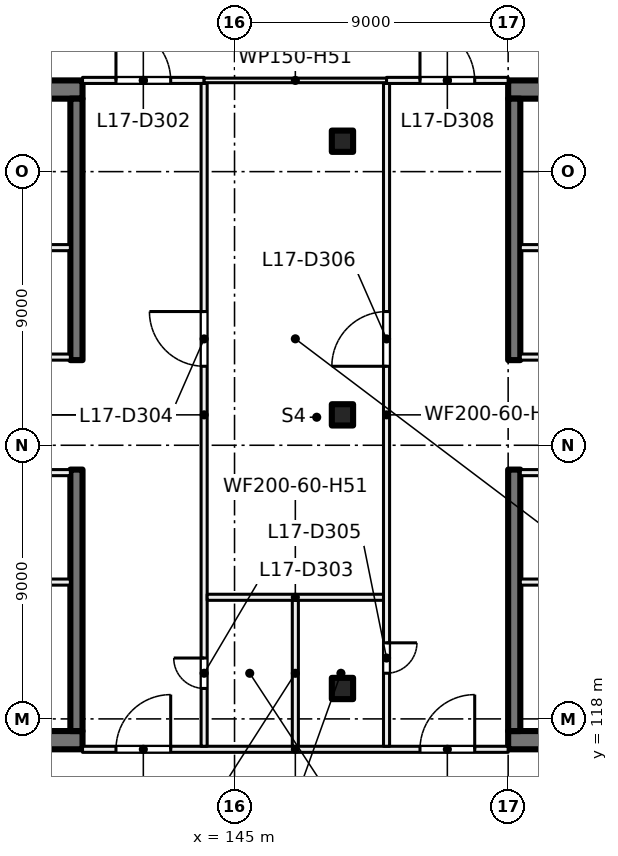
"""IFC4 building model, lengths in metres.
Left out: names, types, materials, properties, quantities, classifications, styles, units other than length and angle.
Written with IfcOpenShell. Run it as: python <this file> out.ifc"""

import sys

from ifc_helpers import new_model, si_unit, direction, frame, frame_2d, origin, origin_2d, place, context, subcontext, project, spatial, rectangle, extrude, element, fill, save


model = new_model("IFC4")
c1 = context("Model", 3, precision=1e-05, world=origin(), true_north=direction((0.0, 1.0)))
c2 = subcontext(c1, "Body", "Model", "MODEL_VIEW")
j1 = project(units=[si_unit("LENGTHUNIT", "METRE"), si_unit("PLANEANGLEUNIT", "RADIAN")], contexts=[c1])
p1 = place(None, origin())
s1 = spatial("IfcSite", under=j1, at=p1, CompositionType="ELEMENT")
p2 = place(p1, origin())
s2 = spatial("IfcBuilding", under=s1, at=p2, CompositionType="ELEMENT")
p3 = place(p2, frame((0.0, 0.0, 75.5)))
s3 = spatial("IfcBuildingStorey", under=s2, at=p3, CompositionType="ELEMENT", Elevation=75.5)
for number, where, z_axis, x_axis in (
    (1, (148.55, 119.0, 0.0), (0.0, 0.0, 1.0), (1.0, 0.0, 0.0)),
    (2, (148.55, 128.0, 0.0), (0.0, 0.0, 1.0), (1.0, 0.0, 0.0)),
    (3, (148.55, 137.0, 0.0), (0.0, 0.0, 1.0), (1.0, 0.0, 0.0)),
):
    element("IfcColumn", number, at=place(p3, frame(where, z_axis=z_axis, x_axis=x_axis)), inside=s3, PredefinedType="COLUMN", context=c2, shape_type="SweptSolid", body=[
        extrude(rectangle(XDim=0.7, YDim=0.7, at=origin_2d()), origin(), (0.0, 0.0, 1.0), 5.5),
    ])
for number, where, z_axis, x_axis in (
    (4, (135.4, 117.3, 0.0), (0.0, 0.0, 1.0), (1.0, 0.0, 0.0)),
    (5, (135.4, 138.7, 0.0), (0.0, 0.0, 1.0), (1.0, 0.0, 0.0)),
):
    element("IfcWall", number, at=place(p3, frame(where, z_axis=z_axis, x_axis=x_axis)), inside=s3, PredefinedType="SHEAR", context=c2, shape_type="SweptSolid", body=[
        extrude(rectangle(XDim=4.6, YDim=0.6, at=frame_2d((2.3, 0.0))), origin(), (0.0, 0.0, 1.0), 5.5),
    ])
for number, where, z_axis, x_axis in (
    (6, (139.8, 117.6, 0.0), (0.0, 0.0, 1.0), (0.0, 1.0, 0.0)),
    (7, (139.8, 129.8, 0.0), (0.0, 0.0, 1.0), (0.0, 1.0, 0.0)),
):
    element("IfcWall", number, at=place(p3, frame(where, z_axis=z_axis, x_axis=x_axis)), inside=s3, PredefinedType="SHEAR", context=c2, shape_type="SweptSolid", body=[
        extrude(rectangle(XDim=8.6, YDim=0.4, at=frame_2d((4.3, 0.0))), origin(), (0.0, 0.0, 1.0), 5.5),
    ])
for number, where, z_axis, x_axis in (
    (8, (158.6, 138.7, 0.0), (0.0, 0.0, 1.0), (-1.0, 0.0, 0.0)),
    (9, (158.6, 117.3, 0.0), (0.0, 0.0, 1.0), (-1.0, 0.0, 0.0)),
):
    element("IfcWall", number, at=place(p3, frame(where, z_axis=z_axis, x_axis=x_axis)), inside=s3, PredefinedType="SHEAR", context=c2, shape_type="SweptSolid", body=[
        extrude(rectangle(XDim=4.6, YDim=0.6, at=frame_2d((2.3, 0.0))), origin(), (0.0, 0.0, 1.0), 5.5),
    ])
for number, where, z_axis, x_axis in (
    (10, (154.2, 138.4, 0.0), (0.0, 0.0, 1.0), (0.0, -1.0, 0.0)),
    (11, (154.2, 126.2, 0.0), (0.0, 0.0, 1.0), (0.0, -1.0, 0.0)),
):
    element("IfcWall", number, at=place(p3, frame(where, z_axis=z_axis, x_axis=x_axis)), inside=s3, PredefinedType="SHEAR", context=c2, shape_type="SweptSolid", body=[
        extrude(rectangle(XDim=8.6, YDim=0.4, at=frame_2d((4.3, 0.0))), origin(), (0.0, 0.0, 1.0), 5.5),
    ])
p4 = place(p3, frame((135.0, 129.9, 0.0), z_axis=(0.0, 0.0, 1.0), x_axis=(1.0, 0.0, 0.0)))
e12 = element("IfcWall", 12, at=p4, inside=s3, PredefinedType="PARTITIONING", context=c2, shape_type="SweptSolid", body=[
    extrude(rectangle(XDim=4.6, YDim=0.2, at=frame_2d((2.3, 0.0))), origin(), (0.0, 0.0, 1.0), 5.125),
])
p5 = place(p4, frame((1.7, 0.0, 0.0)))
e13 = element("IfcOpeningElement", 13, at=p5, cuts=e12, PredefinedType="OPENING", context=c2, shape_type="SweptSolid", body=[
    extrude(rectangle(XDim=1.2, YDim=2.1, at=frame_2d((0.6, 1.05))), frame((0.0, 0.11, 0.0), z_axis=(0.0, -1.0, 0.0), x_axis=(1.0, 0.0, 0.0)), (0.0, 0.0, 1.0), 0.22),
])
p6 = place(p3, frame((135.0, 133.5, 0.0), z_axis=(0.0, 0.0, 1.0), x_axis=(1.0, 0.0, 0.0)))
e14 = element("IfcWall", 14, at=p6, inside=s3, PredefinedType="PARTITIONING", context=c2, shape_type="SweptSolid", body=[
    extrude(rectangle(XDim=4.6, YDim=0.2, at=frame_2d((2.3, 0.0))), origin(), (0.0, 0.0, 1.0), 5.125),
])
p7 = place(p6, frame((1.75, 0.0, 0.0)))
e15 = element("IfcOpeningElement", 15, at=p7, cuts=e14, PredefinedType="OPENING", context=c2, shape_type="SweptSolid", body=[
    extrude(rectangle(XDim=1.5, YDim=2.1, at=frame_2d((0.75, 1.05))), frame((0.0, 0.11, 0.0), z_axis=(0.0, -1.0, 0.0), x_axis=(1.0, 0.0, 0.0)), (0.0, 0.0, 1.0), 0.22),
])
p8 = place(p3, frame((139.6, 126.1, 0.0), z_axis=(0.0, 0.0, 1.0), x_axis=(-1.0, 0.0, 0.0)))
e16 = element("IfcWall", 16, at=p8, inside=s3, PredefinedType="PARTITIONING", context=c2, shape_type="SweptSolid", body=[
    extrude(rectangle(XDim=4.6, YDim=0.2, at=frame_2d((2.3, 0.0))), origin(), (0.0, 0.0, 1.0), 5.125),
])
p9 = place(p8, frame((1.7, 0.0, 0.0)))
e17 = element("IfcOpeningElement", 17, at=p9, cuts=e16, PredefinedType="OPENING", context=c2, shape_type="SweptSolid", body=[
    extrude(rectangle(XDim=1.2, YDim=2.1, at=frame_2d((0.6, 1.05))), frame((0.0, 0.11, 0.0), z_axis=(0.0, -1.0, 0.0), x_axis=(1.0, 0.0, 0.0)), (0.0, 0.0, 1.0), 0.22),
])
p10 = place(p3, frame((139.6, 122.5, 0.0), z_axis=(0.0, 0.0, 1.0), x_axis=(-1.0, 0.0, 0.0)))
e18 = element("IfcWall", 18, at=p10, inside=s3, PredefinedType="PARTITIONING", context=c2, shape_type="SweptSolid", body=[
    extrude(rectangle(XDim=4.6, YDim=0.2, at=frame_2d((2.3, 0.0))), origin(), (0.0, 0.0, 1.0), 5.125),
])
p11 = place(p10, frame((1.35, 0.0, 0.0)))
e19 = element("IfcOpeningElement", 19, at=p11, cuts=e18, PredefinedType="OPENING", context=c2, shape_type="SweptSolid", body=[
    extrude(rectangle(XDim=1.5, YDim=2.1, at=frame_2d((0.75, 1.05))), frame((0.0, 0.11, 0.0), z_axis=(0.0, -1.0, 0.0), x_axis=(1.0, 0.0, 0.0)), (0.0, 0.0, 1.0), 0.22),
])
p12 = place(p3, frame((163.8, 126.1, 0.0), z_axis=(0.0, 0.0, 1.0), x_axis=(-1.0, 0.0, 0.0)))
e20 = element("IfcWall", 20, at=p12, inside=s3, PredefinedType="PARTITIONING", context=c2, shape_type="SweptSolid", body=[
    extrude(rectangle(XDim=9.4, YDim=0.2, at=frame_2d((4.7, 0.0))), origin(), (0.0, 0.0, 1.0), 5.125),
])
p13 = place(p12, frame((4.1, 0.0, 0.0)))
e21 = element("IfcOpeningElement", 21, at=p13, cuts=e20, PredefinedType="OPENING", context=c2, shape_type="SweptSolid", body=[
    extrude(rectangle(XDim=1.2, YDim=2.1, at=frame_2d((0.6, 1.05))), frame((0.0, 0.11, 0.0), z_axis=(0.0, -1.0, 0.0), x_axis=(1.0, 0.0, 0.0)), (0.0, 0.0, 1.0), 0.22),
])
p14 = place(p3, frame((163.8, 122.5, 0.0), z_axis=(0.0, 0.0, 1.0), x_axis=(-1.0, 0.0, 0.0)))
e22 = element("IfcWall", 22, at=p14, inside=s3, PredefinedType="PARTITIONING", context=c2, shape_type="SweptSolid", body=[
    extrude(rectangle(XDim=9.4, YDim=0.2, at=frame_2d((4.7, 0.0))), origin(), (0.0, 0.0, 1.0), 5.125),
])
p15 = place(p14, frame((6.55, 0.0, 0.0)))
e23 = element("IfcOpeningElement", 23, at=p15, cuts=e22, PredefinedType="OPENING", context=c2, shape_type="SweptSolid", body=[
    extrude(rectangle(XDim=1.5, YDim=2.1, at=frame_2d((0.75, 1.05))), frame((0.0, 0.11, 0.0), z_axis=(0.0, -1.0, 0.0), x_axis=(1.0, 0.0, 0.0)), (0.0, 0.0, 1.0), 0.22),
])
p16 = place(p3, frame((154.4, 129.9, 0.0), z_axis=(0.0, 0.0, 1.0), x_axis=(1.0, 0.0, 0.0)))
e24 = element("IfcWall", 24, at=p16, inside=s3, PredefinedType="PARTITIONING", context=c2, shape_type="SweptSolid", body=[
    extrude(rectangle(XDim=9.4, YDim=0.2, at=frame_2d((4.7, 0.0))), origin(), (0.0, 0.0, 1.0), 5.125),
])
p17 = place(p16, frame((4.1, 0.0, 0.0)))
e25 = element("IfcOpeningElement", 25, at=p17, cuts=e24, PredefinedType="OPENING", context=c2, shape_type="SweptSolid", body=[
    extrude(rectangle(XDim=1.2, YDim=2.1, at=frame_2d((0.6, 1.05))), frame((0.0, 0.11, 0.0), z_axis=(0.0, -1.0, 0.0), x_axis=(1.0, 0.0, 0.0)), (0.0, 0.0, 1.0), 0.22),
])
p18 = place(p3, frame((154.4, 133.5, 0.0), z_axis=(0.0, 0.0, 1.0), x_axis=(1.0, 0.0, 0.0)))
e26 = element("IfcWall", 26, at=p18, inside=s3, PredefinedType="PARTITIONING", context=c2, shape_type="SweptSolid", body=[
    extrude(rectangle(XDim=9.4, YDim=0.2, at=frame_2d((4.7, 0.0))), origin(), (0.0, 0.0, 1.0), 5.125),
])
p19 = place(p18, frame((1.35, 0.0, 0.0)))
e27 = element("IfcOpeningElement", 27, at=p19, cuts=e26, PredefinedType="OPENING", context=c2, shape_type="SweptSolid", body=[
    extrude(rectangle(XDim=1.5, YDim=2.1, at=frame_2d((0.75, 1.05))), frame((0.0, 0.11, 0.0), z_axis=(0.0, -1.0, 0.0), x_axis=(1.0, 0.0, 0.0)), (0.0, 0.0, 1.0), 0.22),
])
p20 = place(p3, frame((154.0, 117.0, 0.0), z_axis=(0.0, 0.0, 1.0), x_axis=(-1.0, 0.0, 0.0)))
e28 = element("IfcWall", 28, at=p20, inside=s3, PredefinedType="PARTITIONING", context=c2, shape_type="SweptSolid", body=[
    extrude(rectangle(XDim=14.0, YDim=0.2, at=frame_2d((7.0, 0.0))), origin(), (0.0, 0.0, 1.0), 5.125),
])
p21 = place(p20, frame((11.1, 0.0, 0.0)))
e29 = element("IfcOpeningElement", 29, at=p21, cuts=e28, PredefinedType="OPENING", context=c2, shape_type="SweptSolid", body=[
    extrude(rectangle(XDim=1.8, YDim=2.1, at=frame_2d((0.9, 1.05))), frame((0.0, 0.11, 0.0), z_axis=(0.0, -1.0, 0.0), x_axis=(1.0, 0.0, 0.0)), (0.0, 0.0, 1.0), 0.22),
])
p22 = place(p20, frame((1.1, 0.0, 0.0)))
e30 = element("IfcOpeningElement", 30, at=p22, cuts=e28, PredefinedType="OPENING", context=c2, shape_type="SweptSolid", body=[
    extrude(rectangle(XDim=1.8, YDim=2.1, at=frame_2d((0.9, 1.05))), frame((0.0, 0.11, 0.0), z_axis=(0.0, -1.0, 0.0), x_axis=(1.0, 0.0, 0.0)), (0.0, 0.0, 1.0), 0.22),
])
p23 = place(p3, frame((140.0, 139.0, 0.0), z_axis=(0.0, 0.0, 1.0), x_axis=(1.0, 0.0, 0.0)))
e31 = element("IfcWall", 31, at=p23, inside=s3, PredefinedType="PARTITIONING", context=c2, shape_type="SweptSolid", body=[
    extrude(rectangle(XDim=4.0, YDim=0.2, at=frame_2d((2.0, 0.0))), origin(), (0.0, 0.0, 1.0), 5.125),
])
p24 = place(p23, frame((1.1, 0.0, 0.0)))
e32 = element("IfcOpeningElement", 32, at=p24, cuts=e31, PredefinedType="OPENING", context=c2, shape_type="SweptSolid", body=[
    extrude(rectangle(XDim=1.8, YDim=2.1, at=frame_2d((0.9, 1.05))), frame((0.0, 0.11, 0.0), z_axis=(0.0, -1.0, 0.0), x_axis=(1.0, 0.0, 0.0)), (0.0, 0.0, 1.0), 0.22),
])
p25 = place(p3, frame((144.0, 138.9, 0.0), z_axis=(0.0, 0.0, 1.0), x_axis=(0.0, -1.0, 0.0)))
e33 = element("IfcWall", 33, at=p25, inside=s3, PredefinedType="PARTITIONING", context=c2, shape_type="SweptSolid", body=[
    extrude(rectangle(XDim=21.8, YDim=0.2, at=frame_2d((10.9, 0.0))), origin(), (0.0, 0.0, 1.0), 5.125),
])
p26 = place(p25, frame((18.898, 0.0, 0.0)))
e34 = element("IfcOpeningElement", 34, at=p26, cuts=e33, PredefinedType="OPENING", context=c2, shape_type="SweptSolid", body=[
    extrude(rectangle(XDim=1.0, YDim=2.1, at=frame_2d((0.5, 1.05))), frame((0.0, 0.11, 0.0), z_axis=(0.0, -1.0, 0.0), x_axis=(1.0, 0.0, 0.0)), (0.0, 0.0, 1.0), 0.22),
])
p27 = place(p25, frame((7.502, 0.0, 0.0)))
e35 = element("IfcOpeningElement", 35, at=p27, cuts=e33, PredefinedType="OPENING", context=c2, shape_type="SweptSolid", body=[
    extrude(rectangle(XDim=1.8, YDim=2.1, at=frame_2d((0.9, 1.05))), frame((0.0, 0.11, 0.0), z_axis=(0.0, -1.0, 0.0), x_axis=(1.0, 0.0, 0.0)), (0.0, 0.0, 1.0), 0.22),
])
p28 = place(p3, frame((144.1, 122.0, 0.0), z_axis=(0.0, 0.0, 1.0), x_axis=(1.0, 0.0, 0.0)))
e36 = element("IfcWall", 36, at=p28, inside=s3, PredefinedType="PARTITIONING", context=c2, shape_type="SweptSolid", body=[
    extrude(rectangle(XDim=5.8, YDim=0.2, at=frame_2d((2.9, 0.0))), origin(), (0.0, 0.0, 1.0), 5.125),
])
p29 = place(p3, frame((144.0, 139.0, 0.0), z_axis=(0.0, 0.0, 1.0), x_axis=(1.0, 0.0, 0.0)))
e37 = element("IfcWall", 37, at=p29, inside=s3, PredefinedType="PARTITIONING", context=c2, shape_type="SweptSolid", body=[
    extrude(rectangle(XDim=6.0, YDim=0.15, at=frame_2d((3.0, 0.0))), origin(), (0.0, 0.0, 1.0), 5.125),
])
p30 = place(p3, frame((147.0, 117.1, 0.0), z_axis=(0.0, 0.0, 1.0), x_axis=(0.0, 1.0, 0.0)))
e38 = element("IfcWall", 38, at=p30, inside=s3, PredefinedType="PARTITIONING", context=c2, shape_type="SweptSolid", body=[
    extrude(rectangle(XDim=4.8, YDim=0.2, at=frame_2d((2.4, 0.0))), origin(), (0.0, 0.0, 1.0), 5.125),
])
p31 = place(p3, frame((150.0, 117.1, 0.0), z_axis=(0.0, 0.0, 1.0), x_axis=(0.0, 1.0, 0.0)))
e39 = element("IfcWall", 39, at=p31, inside=s3, PredefinedType="PARTITIONING", context=c2, shape_type="SweptSolid", body=[
    extrude(rectangle(XDim=21.8, YDim=0.2, at=frame_2d((10.9, 0.0))), origin(), (0.0, 0.0, 1.0), 5.125),
])
p32 = place(p31, frame((2.402, 0.0, 0.0)))
e40 = element("IfcOpeningElement", 40, at=p32, cuts=e39, PredefinedType="OPENING", context=c2, shape_type="SweptSolid", body=[
    extrude(rectangle(XDim=1.0, YDim=2.1, at=frame_2d((0.5, 1.05))), frame((0.0, 0.11, 0.0), z_axis=(0.0, -1.0, 0.0), x_axis=(1.0, 0.0, 0.0)), (0.0, 0.0, 1.0), 0.22),
])
p33 = place(p31, frame((12.498, 0.0, 0.0)))
e41 = element("IfcOpeningElement", 41, at=p33, cuts=e39, PredefinedType="OPENING", context=c2, shape_type="SweptSolid", body=[
    extrude(rectangle(XDim=1.8, YDim=2.1, at=frame_2d((0.9, 1.05))), frame((0.0, 0.11, 0.0), z_axis=(0.0, -1.0, 0.0), x_axis=(1.0, 0.0, 0.0)), (0.0, 0.0, 1.0), 0.22),
])
p34 = place(p3, frame((150.0, 139.0, 0.0), z_axis=(0.0, 0.0, 1.0), x_axis=(1.0, 0.0, 0.0)))
e42 = element("IfcWall", 42, at=p34, inside=s3, PredefinedType="PARTITIONING", context=c2, shape_type="SweptSolid", body=[
    extrude(rectangle(XDim=4.0, YDim=0.2, at=frame_2d((2.0, 0.0))), origin(), (0.0, 0.0, 1.0), 5.125),
])
p35 = place(p34, frame((1.1, 0.0, 0.0)))
e43 = element("IfcOpeningElement", 43, at=p35, cuts=e42, PredefinedType="OPENING", context=c2, shape_type="SweptSolid", body=[
    extrude(rectangle(XDim=1.8, YDim=2.1, at=frame_2d((0.9, 1.05))), frame((0.0, 0.11, 0.0), z_axis=(0.0, -1.0, 0.0), x_axis=(1.0, 0.0, 0.0)), (0.0, 0.0, 1.0), 0.22),
])
p36 = place(p21, origin())
e44 = element("IfcDoor", 44, at=p36, inside=s3, OperationType="DOUBLE_DOOR_SINGLE_SWING", PredefinedType="DOOR", context=c2, shape_type="SweptSolid", body=[
    extrude(rectangle(XDim=1.8, YDim=2.1, at=frame_2d((0.9, 1.05))), frame((0.0, 0.025, 0.0), z_axis=(0.0, -1.0, 0.0), x_axis=(1.0, 0.0, 0.0)), (0.0, 0.0, 1.0), 0.05),
])
fill(e29, e44)
p37 = place(p24, origin())
e45 = element("IfcDoor", 45, at=p37, inside=s3, OperationType="DOUBLE_DOOR_SINGLE_SWING", PredefinedType="DOOR", context=c2, shape_type="SweptSolid", body=[
    extrude(rectangle(XDim=1.8, YDim=2.1, at=frame_2d((0.9, 1.05))), frame((0.0, 0.025, 0.0), z_axis=(0.0, -1.0, 0.0), x_axis=(1.0, 0.0, 0.0)), (0.0, 0.0, 1.0), 0.05),
])
fill(e32, e45)
p38 = place(p26, origin())
e46 = element("IfcDoor", 46, at=p38, inside=s3, OperationType="SINGLE_SWING_LEFT", PredefinedType="DOOR", context=c2, shape_type="SweptSolid", body=[
    extrude(rectangle(XDim=1.0, YDim=2.1, at=frame_2d((0.5, 1.05))), frame((0.0, 0.025, 0.0), z_axis=(0.0, -1.0, 0.0), x_axis=(1.0, 0.0, 0.0)), (0.0, 0.0, 1.0), 0.05),
])
fill(e34, e46)
p39 = place(p27, origin())
e47 = element("IfcDoor", 47, at=p39, inside=s3, OperationType="DOUBLE_DOOR_SINGLE_SWING", PredefinedType="DOOR", context=c2, shape_type="SweptSolid", body=[
    extrude(rectangle(XDim=1.8, YDim=2.1, at=frame_2d((0.9, 1.05))), frame((0.0, 0.025, 0.0), z_axis=(0.0, -1.0, 0.0), x_axis=(1.0, 0.0, 0.0)), (0.0, 0.0, 1.0), 0.05),
])
fill(e35, e47)
p40 = place(p32, origin())
e48 = element("IfcDoor", 48, at=p40, inside=s3, OperationType="SINGLE_SWING_RIGHT", PredefinedType="DOOR", context=c2, shape_type="SweptSolid", body=[
    extrude(rectangle(XDim=1.0, YDim=2.1, at=frame_2d((0.5, 1.05))), frame((0.0, 0.025, 0.0), z_axis=(0.0, -1.0, 0.0), x_axis=(1.0, 0.0, 0.0)), (0.0, 0.0, 1.0), 0.05),
])
fill(e40, e48)
p41 = place(p33, origin())
e49 = element("IfcDoor", 49, at=p41, inside=s3, OperationType="DOUBLE_DOOR_SINGLE_SWING", PredefinedType="DOOR", context=c2, shape_type="SweptSolid", body=[
    extrude(rectangle(XDim=1.8, YDim=2.1, at=frame_2d((0.9, 1.05))), frame((0.0, 0.025, 0.0), z_axis=(0.0, -1.0, 0.0), x_axis=(1.0, 0.0, 0.0)), (0.0, 0.0, 1.0), 0.05),
])
fill(e41, e49)
p42 = place(p22, origin())
e50 = element("IfcDoor", 50, at=p42, inside=s3, OperationType="DOUBLE_DOOR_SINGLE_SWING", PredefinedType="DOOR", context=c2, shape_type="SweptSolid", body=[
    extrude(rectangle(XDim=1.8, YDim=2.1, at=frame_2d((0.9, 1.05))), frame((0.0, 0.025, 0.0), z_axis=(0.0, -1.0, 0.0), x_axis=(1.0, 0.0, 0.0)), (0.0, 0.0, 1.0), 0.05),
])
fill(e30, e50)
p43 = place(p35, origin())
e51 = element("IfcDoor", 51, at=p43, inside=s3, OperationType="DOUBLE_DOOR_SINGLE_SWING", PredefinedType="DOOR", context=c2, shape_type="SweptSolid", body=[
    extrude(rectangle(XDim=1.8, YDim=2.1, at=frame_2d((0.9, 1.05))), frame((0.0, 0.025, 0.0), z_axis=(0.0, -1.0, 0.0), x_axis=(1.0, 0.0, 0.0)), (0.0, 0.0, 1.0), 0.05),
])
fill(e43, e51)
save(model, sys.argv[1])
